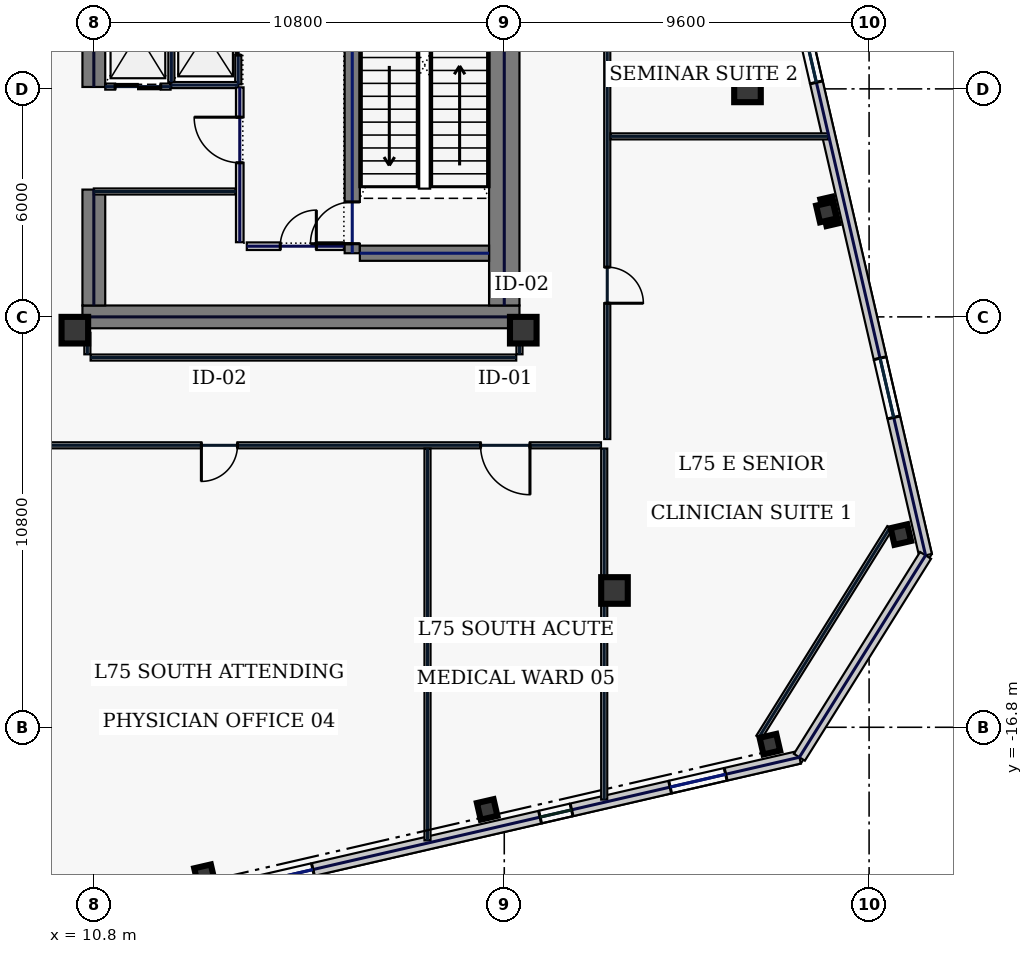
"""IFC4 building model, lengths in metres.
Left out: names, types, materials, properties, quantities, classifications, styles, units other than length and angle.
Written with IfcOpenShell. Run it as: python <this file> out.ifc"""

import sys

from ifc_helpers import new_model, si_unit, direction, frame, frame_2d, origin, origin_2d, place, context, subcontext, project, spatial, rectangle, hollow_rectangle, extrude, element, fill, save


model = new_model("IFC4")
c1 = context("Model", 3, precision=1e-05, world=origin(), true_north=direction((0.0, 1.0)))
c2 = subcontext(c1, "Body", "Model", "MODEL_VIEW")
j1 = project(units=[si_unit("LENGTHUNIT", "METRE"), si_unit("PLANEANGLEUNIT", "RADIAN")], contexts=[c1])
p1 = place(None, origin())
s1 = spatial("IfcSite", under=j1, at=p1, CompositionType="ELEMENT")
p2 = place(p1, origin())
s2 = spatial("IfcBuilding", under=s1, at=p2, CompositionType="ELEMENT")
p3 = place(p2, frame((0.0, 0.0, 321.0)))
s3 = spatial("IfcBuildingStorey", under=s2, at=p3, CompositionType="ELEMENT", Elevation=321.0)
p4 = place(p3, frame((10.5, -6.0, 0.0), z_axis=(0.0, 0.0, 1.0), x_axis=(1.0, 0.0, 0.0)))
e1 = element("IfcWall", 1, at=p4, inside=s3, PredefinedType="SHEAR", context=c2, shape_type="SweptSolid", body=[
    extrude(rectangle(XDim=11.5, YDim=0.6, at=frame_2d((5.75, 0.0))), origin(), (0.0, 0.0, 1.0), 3.74),
])
p5 = place(p3, frame((21.6, -5.7, 0.0), z_axis=(0.0, 0.0, 1.0), x_axis=(0.0, 1.0, 0.0)))
e2 = element("IfcWall", 2, at=p5, inside=s3, PredefinedType="SHEAR", context=c2, shape_type="SweptSolid", body=[
    extrude(rectangle(XDim=11.4, YDim=0.8, at=frame_2d((5.7, 0.0))), origin(), (0.0, 0.0, 1.0), 3.74),
])
p6 = place(p3, frame((10.8, -5.7, 0.0), z_axis=(0.0, 0.0, 1.0), x_axis=(0.0, 1.0, 0.0)))
e3 = element("IfcWall", 3, at=p6, inside=s3, PredefinedType="SHEAR", context=c2, shape_type="SweptSolid", body=[
    extrude(rectangle(XDim=3.05, YDim=0.6, at=frame_2d((1.525, 0.0))), origin(), (0.0, 0.0, 1.0), 3.74),
])
p7 = place(p3, frame((10.8, 0.05, 0.0), z_axis=(0.0, 0.0, 1.0), x_axis=(0.0, 1.0, 0.0)))
e4 = element("IfcWall", 4, at=p7, inside=s3, PredefinedType="SHEAR", context=c2, shape_type="SweptSolid", body=[
    extrude(rectangle(XDim=5.65, YDim=0.6, at=frame_2d((2.825, 0.0))), origin(), (0.0, 0.0, 1.0), 3.74),
])
p8 = place(p3, frame((17.6, -4.325, 0.0), z_axis=(0.0, 0.0, 1.0), x_axis=(0.0, 1.0, 0.0)))
e5 = element("IfcWall", 5, at=p8, inside=s3, PredefinedType="SHEAR", context=c2, shape_type="SweptSolid", body=[
    extrude(rectangle(XDim=8.65, YDim=0.4, at=frame_2d((4.325, 0.0))), origin(), (0.0, 0.0, 1.0), 3.74),
])
p9 = place(p8, frame((0.25, 0.0, 0.0)))
e6 = element("IfcOpeningElement", 6, at=p9, cuts=e5, PredefinedType="OPENING", context=c2, shape_type="SweptSolid", body=[
    extrude(rectangle(XDim=1.1, YDim=2.2, at=frame_2d((0.55, 1.1))), frame((0.0, 0.21, 0.0), z_axis=(0.0, -1.0, 0.0), x_axis=(1.0, 0.0, 0.0)), (0.0, 0.0, 1.0), 0.42),
])
p10 = place(p3, frame((17.8, -4.325, 0.0), z_axis=(0.0, 0.0, 1.0), x_axis=(1.0, 0.0, 0.0)))
e7 = element("IfcWall", 7, at=p10, inside=s3, PredefinedType="SHEAR", context=c2, shape_type="SweptSolid", body=[
    extrude(rectangle(XDim=3.4, YDim=0.4, at=frame_2d((1.7, 0.0))), origin(), (0.0, 0.0, 1.0), 3.74),
])
for number, where, z_axis, x_axis in (
    (8, (10.3, -6.35, 0.0), (0.0, 0.0, 1.0), (1.0, 0.0, 0.0)),
    (9, (22.1, -6.35, 0.0), (0.0, 0.0, 1.0), (1.0, 0.0, 0.0)),
    (10, (24.5, -13.2, 0.0), (0.0, 0.0, 1.0), (1.0, 0.0, 0.0)),
    (11, (28.0, 0.0, 0.0), (0.0, 0.0, 1.0), (1.0, 0.0, 0.0)),
):
    element("IfcColumn", number, at=place(p3, frame(where, z_axis=z_axis, x_axis=x_axis)), inside=s3, PredefinedType="COLUMN", context=c2, shape_type="SweptSolid", body=[
        extrude(hollow_rectangle(XDim=0.7, YDim=0.7, WallThickness=0.032, at=origin_2d()), origin(), (0.0, 0.0, 1.0), 3.74),
    ])
for number, where, z_axis, x_axis in (
    (12, (13.711, -20.68, 0.0), (0.0, 0.0, 1.0), (0.974, 0.225, 0.0)),
    (13, (21.15, -18.962, 0.0), (0.0, 0.0, 1.0), (0.974, 0.225, 0.0)),
    (14, (28.589, -17.245, 0.0), (0.0, 0.0, 1.0), (0.974, 0.225, 0.0)),
    (15, (32.036, -11.728, 0.0), (0.0, 0.0, 1.0), (0.974, 0.225, 0.0)),
    (16, (30.077, -3.241, 0.0), (0.0, 0.0, 1.0), (0.974, 0.225, 0.0)),
):
    element("IfcColumn", number, at=place(p3, frame(where, z_axis=z_axis, x_axis=x_axis)), inside=s3, PredefinedType="COLUMN", context=c2, shape_type="SweptSolid", body=[
        extrude(hollow_rectangle(XDim=0.45, YDim=0.45, WallThickness=0.022, at=origin_2d()), origin(), (0.0, 0.0, 1.0), 3.74),
    ])
p11 = place(p3, frame((12.445, -21.495, 0.0), z_axis=(0.0, 0.0, 1.0), x_axis=(0.974369392164, 0.224953967767, 0.0)))
e17 = element("IfcWall", 17, at=p11, inside=s3, PredefinedType="STANDARD", context=c2, shape_type="SweptSolid", body=[
    extrude(rectangle(XDim=17.366, YDim=0.34, at=frame_2d((8.683, 0.0))), origin(), (0.0, 0.0, 1.0), 3.74),
])
p12 = place(p11, frame((2.729, 0.0, 0.9)))
e18 = element("IfcOpeningElement", 18, at=p12, cuts=e17, PredefinedType="OPENING", context=c2, shape_type="SweptSolid", body=[
    extrude(rectangle(XDim=1.5, YDim=2.0, at=frame_2d((0.75, 1.0))), frame((0.0, 0.18, 0.0), z_axis=(0.0, -1.0, 0.0), x_axis=(1.0, 0.0, 0.0)), (0.0, 0.0, 1.0), 0.36),
])
p13 = place(p11, frame((10.363, 0.0, 0.9)))
e19 = element("IfcOpeningElement", 19, at=p13, cuts=e17, PredefinedType="OPENING", context=c2, shape_type="SweptSolid", body=[
    extrude(rectangle(XDim=0.85, YDim=1.85, at=frame_2d((0.425, 0.925))), frame((0.0, 0.18, 0.0), z_axis=(0.0, -1.0, 0.0), x_axis=(1.0, 0.0, 0.0)), (0.0, 0.0, 1.0), 0.36),
])
p14 = place(p11, frame((13.875, 0.0, 0.9)))
e20 = element("IfcOpeningElement", 20, at=p14, cuts=e17, PredefinedType="OPENING", context=c2, shape_type="SweptSolid", body=[
    extrude(rectangle(XDim=1.5, YDim=2.0, at=frame_2d((0.75, 1.0))), frame((0.0, 0.18, 0.0), z_axis=(0.0, -1.0, 0.0), x_axis=(1.0, 0.0, 0.0)), (0.0, 0.0, 1.0), 0.36),
])
p15 = place(p3, frame((32.686, -12.276, 0.0), z_axis=(0.0, 0.0, 1.0), x_axis=(-0.224953091034, 0.974369594576, 0.0)))
e21 = element("IfcWall", 21, at=p15, inside=s3, PredefinedType="STANDARD", context=c2, shape_type="SweptSolid", body=[
    extrude(rectangle(XDim=36.2, YDim=0.34, at=frame_2d((18.1, 0.0))), origin(), (0.0, 0.0, 1.0), 3.74),
])
p16 = place(p15, frame((3.725, 0.0, 0.58)))
e22 = element("IfcOpeningElement", 22, at=p16, cuts=e21, PredefinedType="OPENING", context=c2, shape_type="SweptSolid", body=[
    extrude(rectangle(XDim=1.6, YDim=2.3, at=frame_2d((0.8, 1.15))), frame((0.0, 0.18, 0.0), z_axis=(0.0, -1.0, 0.0), x_axis=(1.0, 0.0, 0.0)), (0.0, 0.0, 1.0), 0.36),
])
p17 = place(p15, frame((12.775, 0.0, 0.58)))
e23 = element("IfcOpeningElement", 23, at=p17, cuts=e21, PredefinedType="OPENING", context=c2, shape_type="SweptSolid", body=[
    extrude(rectangle(XDim=1.6, YDim=2.3, at=frame_2d((0.8, 1.15))), frame((0.0, 0.18, 0.0), z_axis=(0.0, -1.0, 0.0), x_axis=(1.0, 0.0, 0.0)), (0.0, 0.0, 1.0), 0.36),
])
p18 = place(p15, frame((21.825, 0.0, 0.58)))
e24 = element("IfcOpeningElement", 24, at=p18, cuts=e21, PredefinedType="OPENING", context=c2, shape_type="SweptSolid", body=[
    extrude(rectangle(XDim=1.6, YDim=2.3, at=frame_2d((0.8, 1.15))), frame((0.0, 0.18, 0.0), z_axis=(0.0, -1.0, 0.0), x_axis=(1.0, 0.0, 0.0)), (0.0, 0.0, 1.0), 0.36),
])
p19 = place(p15, frame((30.875, 0.0, 0.58)))
e25 = element("IfcOpeningElement", 25, at=p19, cuts=e21, PredefinedType="OPENING", context=c2, shape_type="SweptSolid", body=[
    extrude(rectangle(XDim=1.6, YDim=2.3, at=frame_2d((0.8, 1.15))), frame((0.0, 0.18, 0.0), z_axis=(0.0, -1.0, 0.0), x_axis=(1.0, 0.0, 0.0)), (0.0, 0.0, 1.0), 0.36),
])
p20 = place(p3, frame((29.366, -17.589, 0.0), z_axis=(0.0, 0.0, 1.0), x_axis=(0.529907862057, 0.848055220921, 0.0)))
e26 = element("IfcWall", 26, at=p20, inside=s3, PredefinedType="STANDARD", context=c2, shape_type="SweptSolid", body=[
    extrude(rectangle(XDim=6.265, YDim=0.34, at=frame_2d((3.132, 0.0))), origin(), (0.0, 0.0, 1.0), 3.74),
])
p21 = place(p3, frame((14.6, 0.12, 0.0), z_axis=(0.0, 0.0, 1.0), x_axis=(0.0, 1.0, 0.0)))
e27 = element("IfcWall", 27, at=p21, inside=s3, PredefinedType="PARTITIONING", context=c2, shape_type="SweptSolid", body=[
    extrude(rectangle(XDim=2.74, YDim=0.16, at=frame_2d((1.37, 0.0))), origin(), (0.0, 0.0, 1.0), 3.74),
])
p22 = place(p21, frame((0.77, 0.0, 0.0)))
e28 = element("IfcOpeningElement", 28, at=p22, cuts=e27, PredefinedType="OPENING", context=c2, shape_type="SweptSolid", body=[
    extrude(rectangle(XDim=1.2, YDim=2.2, at=frame_2d((0.6, 1.1))), frame((0.0, 0.09, 0.0), z_axis=(0.0, -1.0, 0.0), x_axis=(1.0, 0.0, 0.0)), (0.0, 0.0, 1.0), 0.18),
])
p23 = place(p3, frame((12.84, 0.1, 0.0), z_axis=(0.0, 0.0, 1.0), x_axis=(1.0, 0.0, 0.0)))
e29 = element("IfcWall", 29, at=p23, inside=s3, PredefinedType="PARTITIONING", context=c2, shape_type="SweptSolid", body=[
    extrude(rectangle(XDim=1.76, YDim=0.16, at=frame_2d((0.88, 0.0))), origin(), (0.0, 0.0, 1.0), 3.74),
])
p24 = place(p3, frame((12.84, 0.18, 0.0), z_axis=(0.0, 0.0, 1.0), x_axis=(0.0, 1.0, 0.0)))
e30 = element("IfcWall", 30, at=p24, inside=s3, PredefinedType="PARTITIONING", context=c2, shape_type="SweptSolid", body=[
    extrude(rectangle(XDim=2.62, YDim=0.16, at=frame_2d((1.31, 0.0))), origin(), (0.0, 0.0, 1.0), 3.74),
])
p25 = place(p3, frame((11.1, 0.06, 0.0), z_axis=(0.0, 0.0, 1.0), x_axis=(1.0, 0.0, 0.0)))
e31 = element("IfcWall", 31, at=p25, inside=s3, PredefinedType="PARTITIONING", context=c2, shape_type="SweptSolid", body=[
    extrude(rectangle(XDim=1.72, YDim=0.16, at=frame_2d((0.86, 0.0))), origin(), (0.0, 0.0, 1.0), 3.74),
])
p26 = place(p25, frame((0.26, 0.0, 0.0)))
e32 = element("IfcOpeningElement", 32, at=p26, cuts=e31, PredefinedType="OPENING", context=c2, shape_type="SweptSolid", body=[
    extrude(rectangle(XDim=1.2, YDim=2.2, at=frame_2d((0.6, 1.1))), frame((0.0, 0.09, 0.0), z_axis=(0.0, -1.0, 0.0), x_axis=(1.0, 0.0, 0.0)), (0.0, 0.0, 1.0), 0.18),
])
p27 = place(p3, frame((14.825, -4.14, 0.0), z_axis=(0.0, 0.0, 1.0), x_axis=(1.0, 0.0, 0.0)))
e33 = element("IfcWall", 33, at=p27, inside=s3, PredefinedType="SOLIDWALL", context=c2, shape_type="SweptSolid", body=[
    extrude(rectangle(XDim=2.555, YDim=0.2, at=frame_2d((1.277, 0.0))), origin(), (0.0, 0.0, 1.0), 3.74),
])
p28 = place(p27, frame((0.88, 0.0, 0.0)))
e34 = element("IfcOpeningElement", 34, at=p28, cuts=e33, PredefinedType="OPENING", context=c2, shape_type="SweptSolid", body=[
    extrude(rectangle(XDim=0.95, YDim=2.2, at=frame_2d((0.475, 1.1))), frame((0.0, 0.11, 0.0), z_axis=(0.0, -1.0, 0.0), x_axis=(1.0, 0.0, 0.0)), (0.0, 0.0, 1.0), 0.22),
])
p29 = place(p3, frame((10.8, -2.7, 0.0), z_axis=(0.0, 0.0, 1.0), x_axis=(1.0, 0.0, 0.0)))
e35 = element("IfcWall", 35, at=p29, inside=s3, PredefinedType="PARTITIONING", context=c2, shape_type="SweptSolid", body=[
    extrude(rectangle(XDim=3.735, YDim=0.16, at=frame_2d((1.867, 0.0))), origin(), (0.0, 0.0, 1.0), 3.74),
])
p30 = place(p3, frame((14.64, -4.035, 0.0), z_axis=(0.0, 0.0, 1.0), x_axis=(0.0, 1.0, 0.0)))
e36 = element("IfcWall", 36, at=p30, inside=s3, PredefinedType="SOLIDWALL", context=c2, shape_type="SweptSolid", body=[
    extrude(rectangle(XDim=4.075, YDim=0.2, at=frame_2d((2.038, 0.0))), origin(), (0.0, 0.0, 1.0), 3.74),
])
p31 = place(p30, frame((2.09, 0.0, 0.0)))
e37 = element("IfcOpeningElement", 37, at=p31, cuts=e36, PredefinedType="OPENING", context=c2, shape_type="SweptSolid", body=[
    extrude(rectangle(XDim=1.2, YDim=2.2, at=frame_2d((0.6, 1.1))), frame((0.0, 0.11, 0.0), z_axis=(0.0, -1.0, 0.0), x_axis=(1.0, 0.0, 0.0)), (0.0, 0.0, 1.0), 0.22),
])
p32 = place(p3, frame((28.3, -17.065, 0.0), z_axis=(0.0, 0.0, 1.0), x_axis=(0.529914601736, 0.848051009591, 0.0)))
e38 = element("IfcWall", 38, at=p32, inside=s3, PredefinedType="PARTITIONING", context=c2, shape_type="SweptSolid", body=[
    extrude(rectangle(XDim=6.505, YDim=0.16, at=frame_2d((3.253, 0.0))), origin(), (0.0, 0.0, 1.0), 3.74),
])
p33 = place(p3, frame((24.31, 9.415, 0.0), z_axis=(0.0, 0.0, 1.0), x_axis=(0.0, -1.0, 0.0)))
e39 = element("IfcWall", 39, at=p33, inside=s3, PredefinedType="PARTITIONING", context=c2, shape_type="SweptSolid", body=[
    extrude(rectangle(XDim=18.63, YDim=0.16, at=frame_2d((9.315, 0.0))), origin(), (0.0, 0.0, 1.0), 3.74),
])
p34 = place(p33, frame((14.106, 0.0, 0.0)))
e40 = element("IfcOpeningElement", 40, at=p34, cuts=e39, PredefinedType="OPENING", context=c2, shape_type="SweptSolid", body=[
    extrude(rectangle(XDim=0.95, YDim=2.2, at=frame_2d((0.475, 1.1))), frame((0.0, 0.09, 0.0), z_axis=(0.0, -1.0, 0.0), x_axis=(1.0, 0.0, 0.0)), (0.0, 0.0, 1.0), 0.18),
])
p35 = place(p33, frame((5.094, 0.0, 0.0)))
e41 = element("IfcOpeningElement", 41, at=p35, cuts=e39, PredefinedType="OPENING", context=c2, shape_type="SweptSolid", body=[
    extrude(rectangle(XDim=0.95, YDim=2.2, at=frame_2d((0.475, 1.1))), frame((0.0, 0.09, 0.0), z_axis=(0.0, -1.0, 0.0), x_axis=(1.0, 0.0, 0.0)), (0.0, 0.0, 1.0), 0.18),
])
p36 = place(p3, frame((24.145, -9.38, 0.0), z_axis=(0.0, 0.0, 1.0), x_axis=(-1.0, 0.0, 0.0)))
e42 = element("IfcWall", 42, at=p36, inside=s3, PredefinedType="PARTITIONING", context=c2, shape_type="SweptSolid", body=[
    extrude(rectangle(XDim=36.68, YDim=0.16, at=frame_2d((18.34, 0.0))), origin(), (0.0, 0.0, 1.0), 3.74),
])
p37 = place(p36, frame((33.19, 0.0, 0.0)))
e43 = element("IfcOpeningElement", 43, at=p37, cuts=e42, PredefinedType="OPENING", context=c2, shape_type="SweptSolid", body=[
    extrude(rectangle(XDim=0.95, YDim=2.2, at=frame_2d((0.475, 1.1))), frame((0.0, 0.09, 0.0), z_axis=(0.0, -1.0, 0.0), x_axis=(1.0, 0.0, 0.0)), (0.0, 0.0, 1.0), 0.18),
])
p38 = place(p36, frame((26.43, 0.0, 0.0)))
e44 = element("IfcOpeningElement", 44, at=p38, cuts=e42, PredefinedType="OPENING", context=c2, shape_type="SweptSolid", body=[
    extrude(rectangle(XDim=0.95, YDim=2.2, at=frame_2d((0.475, 1.1))), frame((0.0, 0.09, 0.0), z_axis=(0.0, -1.0, 0.0), x_axis=(1.0, 0.0, 0.0)), (0.0, 0.0, 1.0), 0.18),
])
p39 = place(p36, frame((18.63, 0.0, 0.0)))
e45 = element("IfcOpeningElement", 45, at=p39, cuts=e42, PredefinedType="OPENING", context=c2, shape_type="SweptSolid", body=[
    extrude(rectangle(XDim=1.15, YDim=2.2, at=frame_2d((0.575, 1.1))), frame((0.0, 0.09, 0.0), z_axis=(0.0, -1.0, 0.0), x_axis=(1.0, 0.0, 0.0)), (0.0, 0.0, 1.0), 0.18),
])
p40 = place(p36, frame((9.565, 0.0, 0.0)))
e46 = element("IfcOpeningElement", 46, at=p40, cuts=e42, PredefinedType="OPENING", context=c2, shape_type="SweptSolid", body=[
    extrude(rectangle(XDim=0.95, YDim=2.2, at=frame_2d((0.475, 1.1))), frame((0.0, 0.09, 0.0), z_axis=(0.0, -1.0, 0.0), x_axis=(1.0, 0.0, 0.0)), (0.0, 0.0, 1.0), 0.18),
])
p41 = place(p36, frame((1.869, 0.0, 0.0)))
e47 = element("IfcOpeningElement", 47, at=p41, cuts=e42, PredefinedType="OPENING", context=c2, shape_type="SweptSolid", body=[
    extrude(rectangle(XDim=1.3, YDim=2.2, at=frame_2d((0.65, 1.1))), frame((0.0, 0.09, 0.0), z_axis=(0.0, -1.0, 0.0), x_axis=(1.0, 0.0, 0.0)), (0.0, 0.0, 1.0), 0.18),
])
p42 = place(p3, frame((10.63, -6.42, 0.0), z_axis=(0.0, 0.0, 1.0), x_axis=(0.0, -1.0, 0.0)))
e48 = element("IfcWall", 48, at=p42, inside=s3, PredefinedType="PARTITIONING", context=c2, shape_type="SweptSolid", body=[
    extrude(rectangle(XDim=0.565, YDim=0.16, at=frame_2d((0.283, 0.0))), origin(), (0.0, 0.0, 1.0), 3.74),
])
p43 = place(p3, frame((10.715, -7.07, 0.0), z_axis=(0.0, 0.0, 1.0), x_axis=(1.0, 0.0, 0.0)))
e49 = element("IfcWall", 49, at=p43, inside=s3, PredefinedType="PARTITIONING", context=c2, shape_type="SweptSolid", body=[
    extrude(rectangle(XDim=11.2, YDim=0.16, at=frame_2d((5.6, 0.0))), origin(), (0.0, 0.0, 1.0), 3.74),
])
p44 = place(p3, frame((22.0, -6.985, 0.0), z_axis=(0.0, 0.0, 1.0), x_axis=(0.0, 1.0, 0.0)))
e50 = element("IfcWall", 50, at=p44, inside=s3, PredefinedType="PARTITIONING", context=c2, shape_type="SweptSolid", body=[
    extrude(rectangle(XDim=0.565, YDim=0.16, at=frame_2d((0.283, 0.0))), origin(), (0.0, 0.0, 1.0), 3.74),
])
p45 = place(p3, frame((24.23, -18.703, 0.0), z_axis=(0.0, 0.0, 1.0), x_axis=(0.0, 1.0, 0.0)))
e51 = element("IfcWall", 51, at=p45, inside=s3, PredefinedType="PARTITIONING", context=c2, shape_type="SweptSolid", body=[
    extrude(rectangle(XDim=9.238, YDim=0.16, at=frame_2d((4.619, 0.0))), origin(), (0.0, 0.0, 1.0), 3.74),
])
p46 = place(p3, frame((19.58, -19.776, 0.0), z_axis=(0.0, 0.0, 1.0), x_axis=(0.0, 1.0, 0.0)))
e52 = element("IfcWall", 52, at=p46, inside=s3, PredefinedType="PARTITIONING", context=c2, shape_type="SweptSolid", body=[
    extrude(rectangle(XDim=10.311, YDim=0.16, at=frame_2d((5.156, 0.0))), origin(), (0.0, 0.0, 1.0), 3.74),
])
p47 = place(p3, frame((24.395, -1.25, 0.0), z_axis=(0.0, 0.0, 1.0), x_axis=(1.0, 0.0, 0.0)))
e53 = element("IfcWall", 53, at=p47, inside=s3, PredefinedType="PARTITIONING", context=c2, shape_type="SweptSolid", body=[
    extrude(rectangle(XDim=5.725, YDim=0.16, at=frame_2d((2.862, 0.0))), origin(), (0.0, 0.0, 1.0), 3.74),
])
p48 = place(p12, origin())
e54 = element("IfcWindow", 54, at=p48, inside=s3, PartitioningType="SINGLE_PANEL", PredefinedType="WINDOW", context=c2, shape_type="SweptSolid", body=[
    extrude(rectangle(XDim=1.5, YDim=2.0, at=frame_2d((0.75, 1.0))), frame((0.0, 0.03, 0.0), z_axis=(0.0, -1.0, 0.0), x_axis=(1.0, 0.0, 0.0)), (0.0, 0.0, 1.0), 0.06),
])
fill(e18, e54)
p49 = place(p13, origin())
e55 = element("IfcWindow", 55, at=p49, inside=s3, PartitioningType="SINGLE_PANEL", PredefinedType="WINDOW", context=c2, shape_type="SweptSolid", body=[
    extrude(rectangle(XDim=0.85, YDim=1.85, at=frame_2d((0.425, 0.925))), frame((0.0, 0.03, 0.0), z_axis=(0.0, -1.0, 0.0), x_axis=(1.0, 0.0, 0.0)), (0.0, 0.0, 1.0), 0.06),
])
fill(e19, e55)
p50 = place(p14, origin())
e56 = element("IfcWindow", 56, at=p50, inside=s3, PartitioningType="SINGLE_PANEL", PredefinedType="WINDOW", context=c2, shape_type="SweptSolid", body=[
    extrude(rectangle(XDim=1.5, YDim=2.0, at=frame_2d((0.75, 1.0))), frame((0.0, 0.03, 0.0), z_axis=(0.0, -1.0, 0.0), x_axis=(1.0, 0.0, 0.0)), (0.0, 0.0, 1.0), 0.06),
])
fill(e20, e56)
p51 = place(p16, origin())
e57 = element("IfcWindow", 57, at=p51, inside=s3, PartitioningType="SINGLE_PANEL", PredefinedType="WINDOW", context=c2, shape_type="SweptSolid", body=[
    extrude(rectangle(XDim=1.6, YDim=2.3, at=frame_2d((0.8, 1.15))), frame((0.0, 0.03, 0.0), z_axis=(0.0, -1.0, 0.0), x_axis=(1.0, 0.0, 0.0)), (0.0, 0.0, 1.0), 0.06),
])
fill(e22, e57)
p52 = place(p17, origin())
e58 = element("IfcWindow", 58, at=p52, inside=s3, PartitioningType="SINGLE_PANEL", PredefinedType="WINDOW", context=c2, shape_type="SweptSolid", body=[
    extrude(rectangle(XDim=1.6, YDim=2.3, at=frame_2d((0.8, 1.15))), frame((0.0, 0.03, 0.0), z_axis=(0.0, -1.0, 0.0), x_axis=(1.0, 0.0, 0.0)), (0.0, 0.0, 1.0), 0.06),
])
fill(e23, e58)
p53 = place(p9, origin())
e59 = element("IfcDoor", 59, at=p53, inside=s3, OperationType="SINGLE_SWING_LEFT", PredefinedType="DOOR", context=c2, shape_type="SweptSolid", body=[
    extrude(rectangle(XDim=1.1, YDim=2.2, at=frame_2d((0.55, 1.1))), frame((0.0, 0.025, 0.0), z_axis=(0.0, -1.0, 0.0), x_axis=(1.0, 0.0, 0.0)), (0.0, 0.0, 1.0), 0.05),
])
fill(e6, e59)
p54 = place(p22, origin())
e60 = element("IfcDoor", 60, at=p54, inside=s3, OperationType="SLIDING_TO_LEFT", PredefinedType="DOOR", context=c2, shape_type="SweptSolid", body=[
    extrude(rectangle(XDim=1.2, YDim=2.2, at=frame_2d((0.6, 1.1))), frame((0.0, 0.025, 0.0), z_axis=(0.0, -1.0, 0.0), x_axis=(1.0, 0.0, 0.0)), (0.0, 0.0, 1.0), 0.05),
])
fill(e28, e60)
p55 = place(p26, origin())
e61 = element("IfcDoor", 61, at=p55, inside=s3, OperationType="SLIDING_TO_LEFT", PredefinedType="DOOR", context=c2, shape_type="SweptSolid", body=[
    extrude(rectangle(XDim=1.2, YDim=2.2, at=frame_2d((0.6, 1.1))), frame((0.0, 0.025, 0.0), z_axis=(0.0, -1.0, 0.0), x_axis=(1.0, 0.0, 0.0)), (0.0, 0.0, 1.0), 0.05),
])
fill(e32, e61)
p56 = place(p28, origin())
e62 = element("IfcDoor", 62, at=p56, inside=s3, OperationType="SINGLE_SWING_RIGHT", PredefinedType="DOOR", context=c2, shape_type="SweptSolid", body=[
    extrude(rectangle(XDim=0.95, YDim=2.2, at=frame_2d((0.475, 1.1))), frame((0.0, 0.025, 0.0), z_axis=(0.0, -1.0, 0.0), x_axis=(1.0, 0.0, 0.0)), (0.0, 0.0, 1.0), 0.05),
])
fill(e34, e62)
p57 = place(p31, origin())
e63 = element("IfcDoor", 63, at=p57, inside=s3, OperationType="SINGLE_SWING_RIGHT", PredefinedType="DOOR", context=c2, shape_type="SweptSolid", body=[
    extrude(rectangle(XDim=1.2, YDim=2.2, at=frame_2d((0.6, 1.1))), frame((0.0, 0.025, 0.0), z_axis=(0.0, -1.0, 0.0), x_axis=(1.0, 0.0, 0.0)), (0.0, 0.0, 1.0), 0.05),
])
fill(e37, e63)
p58 = place(p40, origin())
e64 = element("IfcDoor", 64, at=p58, inside=s3, OperationType="SINGLE_SWING_RIGHT", PredefinedType="DOOR", context=c2, shape_type="SweptSolid", body=[
    extrude(rectangle(XDim=0.95, YDim=2.2, at=frame_2d((0.475, 1.1))), frame((0.0, 0.025, 0.0), z_axis=(0.0, -1.0, 0.0), x_axis=(1.0, 0.0, 0.0)), (0.0, 0.0, 1.0), 0.05),
])
fill(e46, e64)
p59 = place(p41, origin())
e65 = element("IfcDoor", 65, at=p59, inside=s3, OperationType="SINGLE_SWING_LEFT", PredefinedType="DOOR", context=c2, shape_type="SweptSolid", body=[
    extrude(rectangle(XDim=1.3, YDim=2.2, at=frame_2d((0.65, 1.1))), frame((0.0, 0.025, 0.0), z_axis=(0.0, -1.0, 0.0), x_axis=(1.0, 0.0, 0.0)), (0.0, 0.0, 1.0), 0.05),
])
fill(e47, e65)
p60 = place(p34, origin())
e66 = element("IfcDoor", 66, at=p60, inside=s3, OperationType="SINGLE_SWING_RIGHT", PredefinedType="DOOR", context=c2, shape_type="SweptSolid", body=[
    extrude(rectangle(XDim=0.95, YDim=2.2, at=frame_2d((0.475, 1.1))), frame((0.0, 0.025, 0.0), z_axis=(0.0, -1.0, 0.0), x_axis=(1.0, 0.0, 0.0)), (0.0, 0.0, 1.0), 0.05),
])
fill(e40, e66)
save(model, sys.argv[1])
